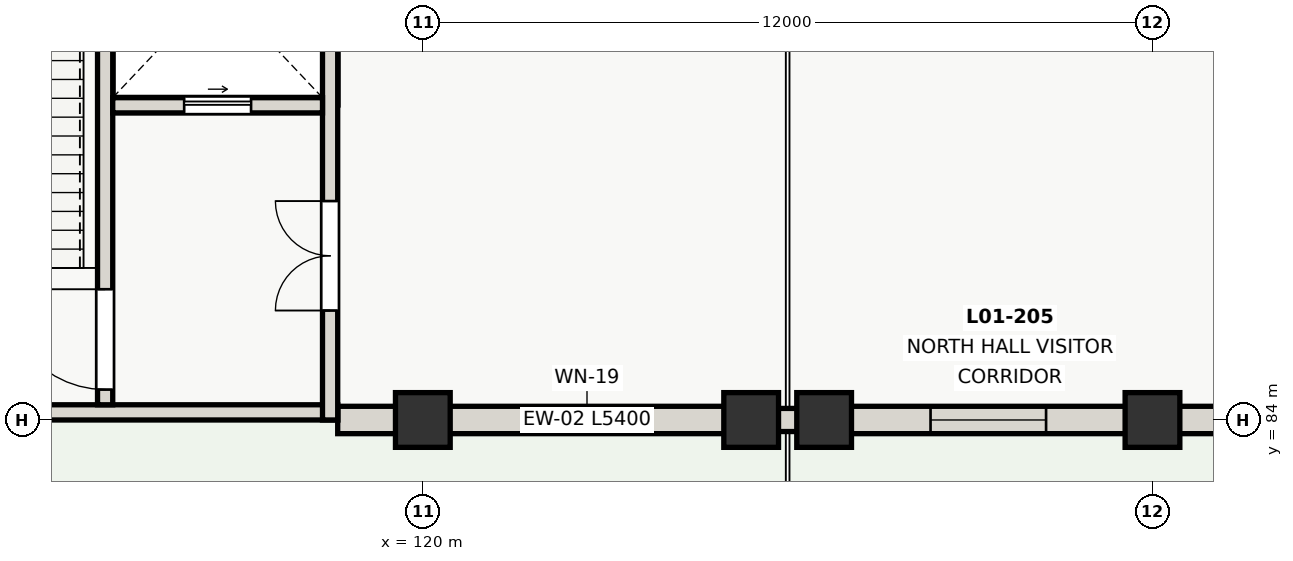
"""IFC4 building model, lengths in metres.
Left out: names, types, materials, properties, quantities, classifications, styles, units other than length and angle.
Written with IfcOpenShell. Run it as: python <this file> out.ifc"""

import sys

from ifc_helpers import new_model, si_unit, direction, frame, frame_2d, origin, origin_2d, place, context, subcontext, project, spatial, rectangle, extrude, element, fill, save


model = new_model("IFC4")
c1 = context("Model", 3, precision=1e-05, world=origin(), true_north=direction((0.0, 1.0)))
c2 = subcontext(c1, "Body", "Model", "MODEL_VIEW")
j1 = project(units=[si_unit("LENGTHUNIT", "METRE"), si_unit("PLANEANGLEUNIT", "RADIAN")], contexts=[c1])
p1 = place(None, origin())
s1 = spatial("IfcSite", under=j1, at=p1, CompositionType="ELEMENT")
p2 = place(p1, origin())
s2 = spatial("IfcBuilding", under=s1, at=p2, CompositionType="ELEMENT")
p3 = place(p2, origin())
s3 = spatial("IfcBuildingStorey", under=s2, at=p3, CompositionType="ELEMENT", Elevation=0.0)
for number, where, z_axis, x_axis in (
    (1, (120.0, 84.0, 0.0), (0.0, 0.0, 1.0), (1.0, 0.0, 0.0)),
    (2, (125.4, 84.0, 0.0), (0.0, 0.0, 1.0), (1.0, 0.0, 0.0)),
    (3, (126.6, 84.0, 0.0), (0.0, 0.0, 1.0), (1.0, 0.0, 0.0)),
    (4, (132.0, 84.0, 0.0), (0.0, 0.0, 1.0), (1.0, 0.0, 0.0)),
):
    element("IfcColumn", number, at=place(p3, frame(where, z_axis=z_axis, x_axis=x_axis)), inside=s3, PredefinedType="COLUMN", context=c2, shape_type="SweptSolid", body=[
        extrude(rectangle(XDim=0.9, YDim=0.9, at=origin_2d()), origin(), (0.0, 0.0, 1.0), 4.2),
    ])
p4 = place(p3, frame((120.0, 84.0, 0.0), z_axis=(0.0, 0.0, 1.0), x_axis=(-1.0, 0.0, 0.0)))
e5 = element("IfcWall", 5, at=p4, inside=s3, PredefinedType="SOLIDWALL", context=c2, shape_type="SweptSolid", body=[
    extrude(rectangle(XDim=1.4, YDim=0.45, at=frame_2d((0.7, 0.0))), origin(), (0.0, 0.0, 1.0), 3.58),
])
p5 = place(p3, frame((125.4, 84.0, 0.0), z_axis=(0.0, 0.0, 1.0), x_axis=(-1.0, 0.0, 0.0)))
e6 = element("IfcWall", 6, at=p5, inside=s3, PredefinedType="SOLIDWALL", context=c2, shape_type="SweptSolid", body=[
    extrude(rectangle(XDim=5.4, YDim=0.45, at=frame_2d((2.7, 0.0))), origin(), (0.0, 0.0, 1.0), 3.58),
])
p6 = place(p5, frame((1.75, 0.0, 0.9)))
e7 = element("IfcOpeningElement", 7, at=p6, cuts=e6, PredefinedType="OPENING", context=c2, shape_type="SweptSolid", body=[
    extrude(rectangle(XDim=1.9, YDim=1.8, at=frame_2d((0.95, 0.9))), frame((0.0, 0.235, 0.0), z_axis=(0.0, -1.0, 0.0), x_axis=(1.0, 0.0, 0.0)), (0.0, 0.0, 1.0), 0.47),
])
p7 = place(p3, frame((132.0, 84.0, 0.0), z_axis=(0.0, 0.0, 1.0), x_axis=(-1.0, 0.0, 0.0)))
e8 = element("IfcWall", 8, at=p7, inside=s3, PredefinedType="SOLIDWALL", context=c2, shape_type="SweptSolid", body=[
    extrude(rectangle(XDim=5.4, YDim=0.45, at=frame_2d((2.7, 0.0))), origin(), (0.0, 0.0, 1.0), 3.58),
])
p8 = place(p7, frame((1.75, 0.0, 0.9)))
e9 = element("IfcOpeningElement", 9, at=p8, cuts=e8, PredefinedType="OPENING", context=c2, shape_type="SweptSolid", body=[
    extrude(rectangle(XDim=1.9, YDim=1.8, at=frame_2d((0.95, 0.9))), frame((0.0, 0.235, 0.0), z_axis=(0.0, -1.0, 0.0), x_axis=(1.0, 0.0, 0.0)), (0.0, 0.0, 1.0), 0.47),
])
p9 = place(p3, frame((133.4, 84.0, 0.0), z_axis=(0.0, 0.0, 1.0), x_axis=(-1.0, 0.0, 0.0)))
e10 = element("IfcWall", 10, at=p9, inside=s3, PredefinedType="SOLIDWALL", context=c2, shape_type="SweptSolid", body=[
    extrude(rectangle(XDim=1.4, YDim=0.45, at=frame_2d((0.7, 0.0))), origin(), (0.0, 0.0, 1.0), 3.58),
])
p10 = place(p3, frame((126.6, 84.0, 0.0), z_axis=(0.0, 0.0, 1.0), x_axis=(-1.0, 0.0, 0.0)))
e11 = element("IfcWall", 11, at=p10, inside=s3, PredefinedType="SOLIDWALL", context=c2, shape_type="SweptSolid", body=[
    extrude(rectangle(XDim=1.2, YDim=0.38, at=frame_2d((0.6, 0.0))), origin(), (0.0, 0.0, 1.0), 4.2),
])
p11 = place(p3, frame((114.78, 89.18, -1.6), z_axis=(0.0, 0.0, 1.0), x_axis=(1.0, 0.0, 0.0)))
e12 = element("IfcWall", 12, at=p11, inside=s3, PredefinedType="SHEAR", context=c2, shape_type="SweptSolid", body=[
    extrude(rectangle(XDim=3.7, YDim=0.25, at=frame_2d((1.85, 0.0))), origin(), (0.0, 0.0, 1.0), 1.6),
])
for number, where, z_axis, x_axis in (
    (13, (118.48, 89.18, -1.6), (0.0, 0.0, 1.0), (0.0, 1.0, 0.0)),
    (14, (114.78, 93.08, -1.6), (0.0, 0.0, 1.0), (0.0, -1.0, 0.0)),
):
    element("IfcWall", number, at=place(p3, frame(where, z_axis=z_axis, x_axis=x_axis)), inside=s3, PredefinedType="SHEAR", context=c2, shape_type="SweptSolid", body=[
        extrude(rectangle(XDim=3.9, YDim=0.25, at=frame_2d((1.95, 0.0))), origin(), (0.0, 0.0, 1.0), 1.6),
    ])
p12 = place(p3, frame((118.6, 84.125, 0.0), z_axis=(0.0, 0.0, 1.0), x_axis=(-1.0, 0.0, 0.0)))
e15 = element("IfcWall", 15, at=p12, inside=s3, PredefinedType="SHEAR", context=c2, shape_type="SweptSolid", body=[
    extrude(rectangle(XDim=9.2, YDim=0.25, at=frame_2d((4.6, 0.0))), origin(), (0.0, 0.0, 1.0), 4.2),
])
p13 = place(p12, frame((5.9, 0.0, 0.0)))
e16 = element("IfcOpeningElement", 16, at=p13, cuts=e15, PredefinedType="OPENING", context=c2, shape_type="SweptSolid", body=[
    extrude(rectangle(XDim=1.9, YDim=2.2, at=frame_2d((0.95, 1.1))), frame((0.0, 0.135, 0.0), z_axis=(0.0, -1.0, 0.0), x_axis=(1.0, 0.0, 0.0)), (0.0, 0.0, 1.0), 0.27),
])
p14 = place(p3, frame((118.475, 84.0, 0.0), z_axis=(0.0, 0.0, 1.0), x_axis=(0.0, 1.0, 0.0)))
e17 = element("IfcWall", 17, at=p14, inside=s3, PredefinedType="SHEAR", context=c2, shape_type="SweptSolid", body=[
    extrude(rectangle(XDim=9.2, YDim=0.25, at=frame_2d((4.6, 0.0))), origin(), (0.0, 0.0, 1.0), 4.2),
])
p15 = place(p14, frame((1.8, 0.0, 0.0)))
e18 = element("IfcOpeningElement", 18, at=p15, cuts=e17, PredefinedType="OPENING", context=c2, shape_type="SweptSolid", body=[
    extrude(rectangle(XDim=1.8, YDim=2.15, at=frame_2d((0.9, 1.075))), frame((0.0, 0.135, 0.0), z_axis=(0.0, -1.0, 0.0), x_axis=(1.0, 0.0, 0.0)), (0.0, 0.0, 1.0), 0.27),
])
p16 = place(p3, frame((114.775, 84.25, 0.0), z_axis=(0.0, 0.0, 1.0), x_axis=(0.0, 1.0, 0.0)))
e19 = element("IfcWall", 19, at=p16, inside=s3, PredefinedType="SHEAR", context=c2, shape_type="SweptSolid", body=[
    extrude(rectangle(XDim=8.7, YDim=0.25, at=frame_2d((4.35, 0.0))), origin(), (0.0, 0.0, 1.0), 4.2),
])
p17 = place(p16, frame((0.25, 0.0, 0.0)))
e20 = element("IfcOpeningElement", 20, at=p17, cuts=e19, PredefinedType="OPENING", context=c2, shape_type="SweptSolid", body=[
    extrude(rectangle(XDim=1.65, YDim=2.1, at=frame_2d((0.825, 1.05))), frame((0.0, 0.135, 0.0), z_axis=(0.0, -1.0, 0.0), x_axis=(1.0, 0.0, 0.0)), (0.0, 0.0, 1.0), 0.27),
])
p18 = place(p3, frame((114.9, 89.175, 0.0), z_axis=(0.0, 0.0, 1.0), x_axis=(1.0, 0.0, 0.0)))
e21 = element("IfcWall", 21, at=p18, inside=s3, PredefinedType="SHEAR", context=c2, shape_type="SweptSolid", body=[
    extrude(rectangle(XDim=3.45, YDim=0.25, at=frame_2d((1.725, 0.0))), origin(), (0.0, 0.0, 1.0), 4.2),
])
p19 = place(p18, frame((1.175, 0.0, 0.0)))
e22 = element("IfcOpeningElement", 22, at=p19, cuts=e21, PredefinedType="OPENING", context=c2, shape_type="SweptSolid", body=[
    extrude(rectangle(XDim=1.1, YDim=2.1, at=frame_2d((0.55, 1.05))), frame((0.0, 0.135, 0.0), z_axis=(0.0, -1.0, 0.0), x_axis=(1.0, 0.0, 0.0)), (0.0, 0.0, 1.0), 0.27),
])
p20 = place(p6, origin())
e23 = element("IfcWindow", 23, at=p20, inside=s3, PartitioningType="SINGLE_PANEL", PredefinedType="WINDOW", context=c2, shape_type="SweptSolid", body=[
    extrude(rectangle(XDim=1.9, YDim=1.8, at=frame_2d((0.95, 0.9))), frame((0.0, 0.03, 0.0), z_axis=(0.0, -1.0, 0.0), x_axis=(1.0, 0.0, 0.0)), (0.0, 0.0, 1.0), 0.06),
])
fill(e7, e23)
p21 = place(p8, origin())
e24 = element("IfcWindow", 24, at=p21, inside=s3, PartitioningType="SINGLE_PANEL", PredefinedType="WINDOW", context=c2, shape_type="SweptSolid", body=[
    extrude(rectangle(XDim=1.9, YDim=1.8, at=frame_2d((0.95, 0.9))), frame((0.0, 0.03, 0.0), z_axis=(0.0, -1.0, 0.0), x_axis=(1.0, 0.0, 0.0)), (0.0, 0.0, 1.0), 0.06),
])
fill(e9, e24)
p22 = place(p15, origin())
e25 = element("IfcDoor", 25, at=p22, inside=s3, OperationType="DOUBLE_DOOR_SINGLE_SWING", PredefinedType="DOOR", context=c2, shape_type="SweptSolid", body=[
    extrude(rectangle(XDim=1.8, YDim=2.15, at=frame_2d((0.9, 1.075))), frame((0.0, 0.025, 0.0), z_axis=(0.0, -1.0, 0.0), x_axis=(1.0, 0.0, 0.0)), (0.0, 0.0, 1.0), 0.05),
])
fill(e18, e25)
p23 = place(p17, origin())
e26 = element("IfcDoor", 26, at=p23, inside=s3, OperationType="SINGLE_SWING_RIGHT", PredefinedType="DOOR", context=c2, shape_type="SweptSolid", body=[
    extrude(rectangle(XDim=1.65, YDim=2.1, at=frame_2d((0.825, 1.05))), frame((0.0, 0.025, 0.0), z_axis=(0.0, -1.0, 0.0), x_axis=(1.0, 0.0, 0.0)), (0.0, 0.0, 1.0), 0.05),
])
fill(e20, e26)
p24 = place(p19, origin())
e27 = element("IfcDoor", 27, at=p24, inside=s3, OperationType="SLIDING_TO_RIGHT", PredefinedType="DOOR", context=c2, shape_type="SweptSolid", body=[
    extrude(rectangle(XDim=1.1, YDim=2.1, at=frame_2d((0.55, 1.05))), frame((0.0, 0.025, 0.0), z_axis=(0.0, -1.0, 0.0), x_axis=(1.0, 0.0, 0.0)), (0.0, 0.0, 1.0), 0.05),
])
fill(e22, e27)
save(model, sys.argv[1])
